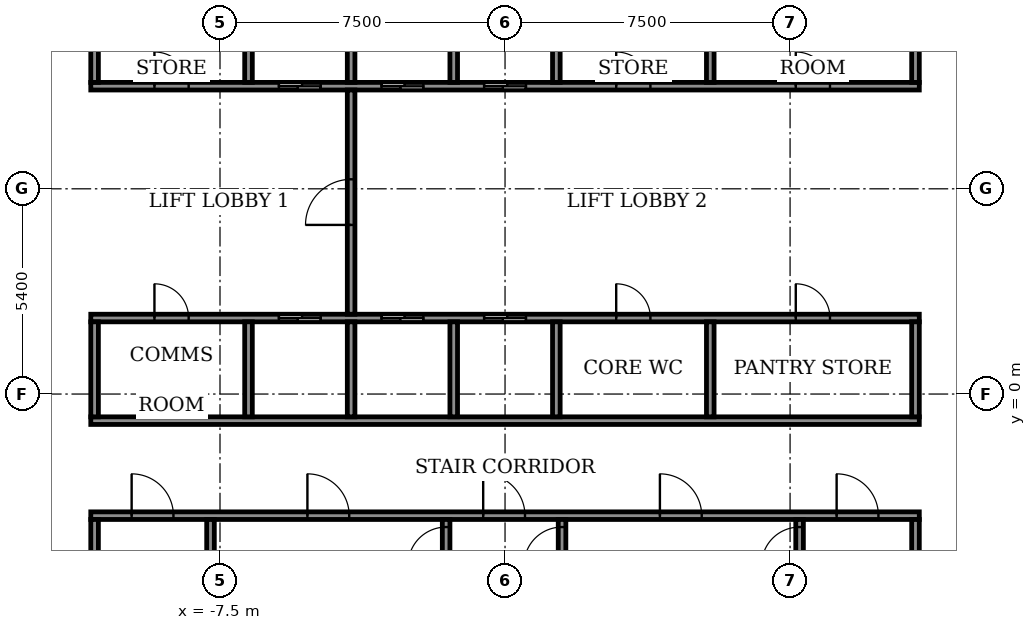
"""IFC4 building model, lengths in metres.
Left out: names, types, materials, properties, quantities, classifications, styles, units other than length and angle.
Written with IfcOpenShell. Run it as: python <this file> out.ifc"""

import sys

from ifc_helpers import new_model, si_unit, direction, frame, frame_2d, origin, place, context, subcontext, project, spatial, rectangle, extrude, element, fill, save


model = new_model("IFC4")
c1 = context("Model", 3, precision=1e-05, world=origin(), true_north=direction((0.0, 1.0)))
c2 = subcontext(c1, "Body", "Model", "MODEL_VIEW")
j1 = project(units=[si_unit("LENGTHUNIT", "METRE"), si_unit("PLANEANGLEUNIT", "RADIAN")], contexts=[c1])
p1 = place(None, origin())
s1 = spatial("IfcSite", under=j1, at=p1, CompositionType="ELEMENT")
p2 = place(p1, origin())
s2 = spatial("IfcBuilding", under=s1, at=p2, CompositionType="ELEMENT")
p3 = place(p2, frame((0.0, 0.0, 301.5)))
s3 = spatial("IfcBuildingStorey", under=s2, at=p3, CompositionType="ELEMENT", Elevation=301.5)
p4 = place(p3, frame((-10.9, -3.2, 0.0), z_axis=(0.0, 0.0, 1.0), x_axis=(1.0, 0.0, 0.0)))
e1 = element("IfcWall", 1, at=p4, inside=s3, PredefinedType="SHEAR", context=c2, shape_type="SweptSolid", body=[
    extrude(rectangle(XDim=21.8, YDim=0.2, at=frame_2d((10.9, 0.0))), origin(), (0.0, 0.0, 1.0), 4.05),
])
p5 = place(p4, frame((1.075, 0.0, 0.0)))
e2 = element("IfcOpeningElement", 2, at=p5, cuts=e1, PredefinedType="OPENING", context=c2, shape_type="SweptSolid", body=[
    extrude(rectangle(XDim=1.1, YDim=2.1, at=frame_2d((0.55, 1.05))), frame((0.0, 0.11, 0.0), z_axis=(0.0, -1.0, 0.0), x_axis=(1.0, 0.0, 0.0)), (0.0, 0.0, 1.0), 0.22),
])
p6 = place(p4, frame((10.325, 0.0, 0.0)))
e3 = element("IfcOpeningElement", 3, at=p6, cuts=e1, PredefinedType="OPENING", context=c2, shape_type="SweptSolid", body=[
    extrude(rectangle(XDim=1.1, YDim=2.1, at=frame_2d((0.55, 1.05))), frame((0.0, 0.11, 0.0), z_axis=(0.0, -1.0, 0.0), x_axis=(1.0, 0.0, 0.0)), (0.0, 0.0, 1.0), 0.22),
])
p7 = place(p4, frame((19.625, 0.0, 0.0)))
e4 = element("IfcOpeningElement", 4, at=p7, cuts=e1, PredefinedType="OPENING", context=c2, shape_type="SweptSolid", body=[
    extrude(rectangle(XDim=1.1, YDim=2.1, at=frame_2d((0.55, 1.05))), frame((0.0, 0.11, 0.0), z_axis=(0.0, -1.0, 0.0), x_axis=(1.0, 0.0, 0.0)), (0.0, 0.0, 1.0), 0.22),
])
p8 = place(p4, frame((5.7, 0.0, 0.0)))
e5 = element("IfcOpeningElement", 5, at=p8, cuts=e1, PredefinedType="OPENING", context=c2, shape_type="SweptSolid", body=[
    extrude(rectangle(XDim=1.1, YDim=2.1, at=frame_2d((0.55, 1.05))), frame((0.0, 0.11, 0.0), z_axis=(0.0, -1.0, 0.0), x_axis=(1.0, 0.0, 0.0)), (0.0, 0.0, 1.0), 0.22),
])
p9 = place(p4, frame((14.975, 0.0, 0.0)))
e6 = element("IfcOpeningElement", 6, at=p9, cuts=e1, PredefinedType="OPENING", context=c2, shape_type="SweptSolid", body=[
    extrude(rectangle(XDim=1.1, YDim=2.1, at=frame_2d((0.55, 1.05))), frame((0.0, 0.11, 0.0), z_axis=(0.0, -1.0, 0.0), x_axis=(1.0, 0.0, 0.0)), (0.0, 0.0, 1.0), 0.22),
])
p10 = place(p3, frame((-10.9, -0.7, 0.0), z_axis=(0.0, 0.0, 1.0), x_axis=(1.0, 0.0, 0.0)))
e7 = element("IfcWall", 7, at=p10, inside=s3, PredefinedType="SHEAR", context=c2, shape_type="SweptSolid", body=[
    extrude(rectangle(XDim=21.8, YDim=0.2, at=frame_2d((10.9, 0.0))), origin(), (0.0, 0.0, 1.0), 4.05),
])
p11 = place(p3, frame((-10.9, 2.0, 0.0), z_axis=(0.0, 0.0, 1.0), x_axis=(1.0, 0.0, 0.0)))
e8 = element("IfcWall", 8, at=p11, inside=s3, PredefinedType="SHEAR", context=c2, shape_type="SweptSolid", body=[
    extrude(rectangle(XDim=21.8, YDim=0.2, at=frame_2d((10.9, 0.0))), origin(), (0.0, 0.0, 1.0), 4.05),
])
p12 = place(p11, frame((4.95, 0.0, 0.0)))
e9 = element("IfcOpeningElement", 9, at=p12, cuts=e8, PredefinedType="OPENING", context=c2, shape_type="SweptSolid", body=[
    extrude(rectangle(XDim=1.1, YDim=2.1, at=frame_2d((0.55, 1.05))), frame((0.0, 0.11, 0.0), z_axis=(0.0, -1.0, 0.0), x_axis=(1.0, 0.0, 0.0)), (0.0, 0.0, 1.0), 0.22),
])
p13 = place(p11, frame((7.65, 0.0, 0.0)))
e10 = element("IfcOpeningElement", 10, at=p13, cuts=e8, PredefinedType="OPENING", context=c2, shape_type="SweptSolid", body=[
    extrude(rectangle(XDim=1.1, YDim=2.1, at=frame_2d((0.55, 1.05))), frame((0.0, 0.11, 0.0), z_axis=(0.0, -1.0, 0.0), x_axis=(1.0, 0.0, 0.0)), (0.0, 0.0, 1.0), 0.22),
])
p14 = place(p11, frame((10.35, 0.0, 0.0)))
e11 = element("IfcOpeningElement", 11, at=p14, cuts=e8, PredefinedType="OPENING", context=c2, shape_type="SweptSolid", body=[
    extrude(rectangle(XDim=1.1, YDim=2.1, at=frame_2d((0.55, 1.05))), frame((0.0, 0.11, 0.0), z_axis=(0.0, -1.0, 0.0), x_axis=(1.0, 0.0, 0.0)), (0.0, 0.0, 1.0), 0.22),
])
p15 = place(p11, frame((1.675, 0.0, 0.0)))
e12 = element("IfcOpeningElement", 12, at=p15, cuts=e8, PredefinedType="OPENING", context=c2, shape_type="SweptSolid", body=[
    extrude(rectangle(XDim=0.9, YDim=2.1, at=frame_2d((0.45, 1.05))), frame((0.0, 0.11, 0.0), z_axis=(0.0, -1.0, 0.0), x_axis=(1.0, 0.0, 0.0)), (0.0, 0.0, 1.0), 0.22),
])
p16 = place(p11, frame((13.825, 0.0, 0.0)))
e13 = element("IfcOpeningElement", 13, at=p16, cuts=e8, PredefinedType="OPENING", context=c2, shape_type="SweptSolid", body=[
    extrude(rectangle(XDim=0.9, YDim=2.1, at=frame_2d((0.45, 1.05))), frame((0.0, 0.11, 0.0), z_axis=(0.0, -1.0, 0.0), x_axis=(1.0, 0.0, 0.0)), (0.0, 0.0, 1.0), 0.22),
])
p17 = place(p11, frame((18.55, 0.0, 0.0)))
e14 = element("IfcOpeningElement", 14, at=p17, cuts=e8, PredefinedType="OPENING", context=c2, shape_type="SweptSolid", body=[
    extrude(rectangle(XDim=0.9, YDim=2.1, at=frame_2d((0.45, 1.05))), frame((0.0, 0.11, 0.0), z_axis=(0.0, -1.0, 0.0), x_axis=(1.0, 0.0, 0.0)), (0.0, 0.0, 1.0), 0.22),
])
p18 = place(p3, frame((-10.9, 8.1, 0.0), z_axis=(0.0, 0.0, 1.0), x_axis=(1.0, 0.0, 0.0)))
e15 = element("IfcWall", 15, at=p18, inside=s3, PredefinedType="SHEAR", context=c2, shape_type="SweptSolid", body=[
    extrude(rectangle(XDim=21.8, YDim=0.2, at=frame_2d((10.9, 0.0))), origin(), (0.0, 0.0, 1.0), 4.05),
])
p19 = place(p18, frame((4.95, 0.0, 0.0)))
e16 = element("IfcOpeningElement", 16, at=p19, cuts=e15, PredefinedType="OPENING", context=c2, shape_type="SweptSolid", body=[
    extrude(rectangle(XDim=1.1, YDim=2.1, at=frame_2d((0.55, 1.05))), frame((0.0, 0.11, 0.0), z_axis=(0.0, -1.0, 0.0), x_axis=(1.0, 0.0, 0.0)), (0.0, 0.0, 1.0), 0.22),
])
p20 = place(p18, frame((7.65, 0.0, 0.0)))
e17 = element("IfcOpeningElement", 17, at=p20, cuts=e15, PredefinedType="OPENING", context=c2, shape_type="SweptSolid", body=[
    extrude(rectangle(XDim=1.1, YDim=2.1, at=frame_2d((0.55, 1.05))), frame((0.0, 0.11, 0.0), z_axis=(0.0, -1.0, 0.0), x_axis=(1.0, 0.0, 0.0)), (0.0, 0.0, 1.0), 0.22),
])
p21 = place(p18, frame((10.35, 0.0, 0.0)))
e18 = element("IfcOpeningElement", 18, at=p21, cuts=e15, PredefinedType="OPENING", context=c2, shape_type="SweptSolid", body=[
    extrude(rectangle(XDim=1.1, YDim=2.1, at=frame_2d((0.55, 1.05))), frame((0.0, 0.11, 0.0), z_axis=(0.0, -1.0, 0.0), x_axis=(1.0, 0.0, 0.0)), (0.0, 0.0, 1.0), 0.22),
])
p22 = place(p18, frame((1.675, 0.0, 0.0)))
e19 = element("IfcOpeningElement", 19, at=p22, cuts=e15, PredefinedType="OPENING", context=c2, shape_type="SweptSolid", body=[
    extrude(rectangle(XDim=0.9, YDim=2.1, at=frame_2d((0.45, 1.05))), frame((0.0, 0.11, 0.0), z_axis=(0.0, -1.0, 0.0), x_axis=(1.0, 0.0, 0.0)), (0.0, 0.0, 1.0), 0.22),
])
p23 = place(p18, frame((13.825, 0.0, 0.0)))
e20 = element("IfcOpeningElement", 20, at=p23, cuts=e15, PredefinedType="OPENING", context=c2, shape_type="SweptSolid", body=[
    extrude(rectangle(XDim=0.9, YDim=2.1, at=frame_2d((0.45, 1.05))), frame((0.0, 0.11, 0.0), z_axis=(0.0, -1.0, 0.0), x_axis=(1.0, 0.0, 0.0)), (0.0, 0.0, 1.0), 0.22),
])
p24 = place(p18, frame((18.55, 0.0, 0.0)))
e21 = element("IfcOpeningElement", 21, at=p24, cuts=e15, PredefinedType="OPENING", context=c2, shape_type="SweptSolid", body=[
    extrude(rectangle(XDim=0.9, YDim=2.1, at=frame_2d((0.45, 1.05))), frame((0.0, 0.11, 0.0), z_axis=(0.0, -1.0, 0.0), x_axis=(1.0, 0.0, 0.0)), (0.0, 0.0, 1.0), 0.22),
])
for number, where, z_axis, x_axis in (
    (22, (-10.8, -10.8, 0.0), (0.0, 0.0, 1.0), (0.0, 1.0, 0.0)),
    (23, (-7.75, -10.8, 0.0), (0.0, 0.0, 1.0), (0.0, 1.0, 0.0)),
):
    element("IfcWall", number, at=place(p3, frame(where, z_axis=z_axis, x_axis=x_axis)), inside=s3, PredefinedType="SHEAR", context=c2, shape_type="SweptSolid", body=[
        extrude(rectangle(XDim=7.5, YDim=0.2, at=frame_2d((3.75, 0.0))), origin(), (0.0, 0.0, 1.0), 4.05),
    ])
p25 = place(p3, frame((-1.55, -10.8, 0.0), z_axis=(0.0, 0.0, 1.0), x_axis=(0.0, 1.0, 0.0)))
e24 = element("IfcWall", 24, at=p25, inside=s3, PredefinedType="SHEAR", context=c2, shape_type="SweptSolid", body=[
    extrude(rectangle(XDim=7.5, YDim=0.2, at=frame_2d((3.75, 0.0))), origin(), (0.0, 0.0, 1.0), 4.05),
])
p26 = place(p25, frame((6.3, 0.0, 0.0)))
e25 = element("IfcOpeningElement", 25, at=p26, cuts=e24, PredefinedType="OPENING", context=c2, shape_type="SweptSolid", body=[
    extrude(rectangle(XDim=1.0, YDim=2.1, at=frame_2d((0.5, 1.05))), frame((0.0, 0.11, 0.0), z_axis=(0.0, -1.0, 0.0), x_axis=(1.0, 0.0, 0.0)), (0.0, 0.0, 1.0), 0.22),
])
p27 = place(p3, frame((1.5, -10.8, 0.0), z_axis=(0.0, 0.0, 1.0), x_axis=(0.0, 1.0, 0.0)))
e26 = element("IfcWall", 26, at=p27, inside=s3, PredefinedType="SHEAR", context=c2, shape_type="SweptSolid", body=[
    extrude(rectangle(XDim=7.5, YDim=0.2, at=frame_2d((3.75, 0.0))), origin(), (0.0, 0.0, 1.0), 4.05),
])
p28 = place(p27, frame((6.3, 0.0, 0.0)))
e27 = element("IfcOpeningElement", 27, at=p28, cuts=e26, PredefinedType="OPENING", context=c2, shape_type="SweptSolid", body=[
    extrude(rectangle(XDim=1.0, YDim=2.1, at=frame_2d((0.5, 1.05))), frame((0.0, 0.11, 0.0), z_axis=(0.0, -1.0, 0.0), x_axis=(1.0, 0.0, 0.0)), (0.0, 0.0, 1.0), 0.22),
])
p29 = place(p3, frame((7.75, -10.8, 0.0), z_axis=(0.0, 0.0, 1.0), x_axis=(0.0, 1.0, 0.0)))
e28 = element("IfcWall", 28, at=p29, inside=s3, PredefinedType="SHEAR", context=c2, shape_type="SweptSolid", body=[
    extrude(rectangle(XDim=7.5, YDim=0.2, at=frame_2d((3.75, 0.0))), origin(), (0.0, 0.0, 1.0), 4.05),
])
p30 = place(p29, frame((6.3, 0.0, 0.0)))
e29 = element("IfcOpeningElement", 29, at=p30, cuts=e28, PredefinedType="OPENING", context=c2, shape_type="SweptSolid", body=[
    extrude(rectangle(XDim=1.0, YDim=2.1, at=frame_2d((0.5, 1.05))), frame((0.0, 0.11, 0.0), z_axis=(0.0, -1.0, 0.0), x_axis=(1.0, 0.0, 0.0)), (0.0, 0.0, 1.0), 0.22),
])
p31 = place(p3, frame((10.8, -10.8, 0.0), z_axis=(0.0, 0.0, 1.0), x_axis=(0.0, 1.0, 0.0)))
e30 = element("IfcWall", 30, at=p31, inside=s3, PredefinedType="SHEAR", context=c2, shape_type="SweptSolid", body=[
    extrude(rectangle(XDim=7.5, YDim=0.2, at=frame_2d((3.75, 0.0))), origin(), (0.0, 0.0, 1.0), 4.05),
])
p32 = place(p3, frame((-10.8, -0.6, 0.0), z_axis=(0.0, 0.0, 1.0), x_axis=(0.0, 1.0, 0.0)))
e31 = element("IfcWall", 31, at=p32, inside=s3, PredefinedType="STANDARD", context=c2, shape_type="SweptSolid", body=[
    extrude(rectangle(XDim=2.5, YDim=0.2, at=frame_2d((1.25, 0.0))), origin(), (0.0, 0.0, 1.0), 4.05),
])
for number, where, z_axis, x_axis in (
    (32, (-6.75, -0.6, 0.0), (0.0, 0.0, 1.0), (0.0, 1.0, 0.0)),
    (33, (-4.05, -0.6, 0.0), (0.0, 0.0, 1.0), (0.0, 1.0, 0.0)),
    (34, (-1.35, -0.6, 0.0), (0.0, 0.0, 1.0), (0.0, 1.0, 0.0)),
    (35, (1.35, -0.6, 0.0), (0.0, 0.0, 1.0), (0.0, 1.0, 0.0)),
):
    element("IfcWall", number, at=place(p3, frame(where, z_axis=z_axis, x_axis=x_axis)), inside=s3, PredefinedType="SHEAR", context=c2, shape_type="SweptSolid", body=[
        extrude(rectangle(XDim=2.5, YDim=0.2, at=frame_2d((1.25, 0.0))), origin(), (0.0, 0.0, 1.0), 4.05),
    ])
for number, where, z_axis, x_axis in (
    (36, (5.4, -0.6, 0.0), (0.0, 0.0, 1.0), (0.0, 1.0, 0.0)),
    (37, (10.8, -0.6, 0.0), (0.0, 0.0, 1.0), (0.0, 1.0, 0.0)),
):
    element("IfcWall", number, at=place(p3, frame(where, z_axis=z_axis, x_axis=x_axis)), inside=s3, PredefinedType="STANDARD", context=c2, shape_type="SweptSolid", body=[
        extrude(rectangle(XDim=2.5, YDim=0.2, at=frame_2d((1.25, 0.0))), origin(), (0.0, 0.0, 1.0), 4.05),
    ])
p33 = place(p3, frame((-10.8, 8.2, 0.0), z_axis=(0.0, 0.0, 1.0), x_axis=(0.0, 1.0, 0.0)))
e38 = element("IfcWall", 38, at=p33, inside=s3, PredefinedType="STANDARD", context=c2, shape_type="SweptSolid", body=[
    extrude(rectangle(XDim=2.6, YDim=0.2, at=frame_2d((1.3, 0.0))), origin(), (0.0, 0.0, 1.0), 4.05),
])
for number, where, z_axis, x_axis in (
    (39, (-6.75, 8.2, 0.0), (0.0, 0.0, 1.0), (0.0, 1.0, 0.0)),
    (40, (-4.05, 8.2, 0.0), (0.0, 0.0, 1.0), (0.0, 1.0, 0.0)),
    (41, (-1.35, 8.2, 0.0), (0.0, 0.0, 1.0), (0.0, 1.0, 0.0)),
    (42, (1.35, 8.2, 0.0), (0.0, 0.0, 1.0), (0.0, 1.0, 0.0)),
):
    element("IfcWall", number, at=place(p3, frame(where, z_axis=z_axis, x_axis=x_axis)), inside=s3, PredefinedType="SHEAR", context=c2, shape_type="SweptSolid", body=[
        extrude(rectangle(XDim=2.6, YDim=0.2, at=frame_2d((1.3, 0.0))), origin(), (0.0, 0.0, 1.0), 4.05),
    ])
for number, where, z_axis, x_axis in (
    (43, (5.4, 8.2, 0.0), (0.0, 0.0, 1.0), (0.0, 1.0, 0.0)),
    (44, (10.8, 8.2, 0.0), (0.0, 0.0, 1.0), (0.0, 1.0, 0.0)),
):
    element("IfcWall", number, at=place(p3, frame(where, z_axis=z_axis, x_axis=x_axis)), inside=s3, PredefinedType="STANDARD", context=c2, shape_type="SweptSolid", body=[
        extrude(rectangle(XDim=2.6, YDim=0.2, at=frame_2d((1.3, 0.0))), origin(), (0.0, 0.0, 1.0), 4.05),
    ])
p34 = place(p3, frame((-4.05, 2.1, 0.0), z_axis=(0.0, 0.0, 1.0), x_axis=(0.0, 1.0, 0.0)))
e45 = element("IfcWall", 45, at=p34, inside=s3, PredefinedType="STANDARD", context=c2, shape_type="SweptSolid", body=[
    extrude(rectangle(XDim=5.9, YDim=0.2, at=frame_2d((2.95, 0.0))), origin(), (0.0, 0.0, 1.0), 4.05),
])
p35 = place(p34, frame((2.35, 0.0, 0.0)))
e46 = element("IfcOpeningElement", 46, at=p35, cuts=e45, PredefinedType="OPENING", context=c2, shape_type="SweptSolid", body=[
    extrude(rectangle(XDim=1.2, YDim=2.1, at=frame_2d((0.6, 1.05))), frame((0.0, 0.11, 0.0), z_axis=(0.0, -1.0, 0.0), x_axis=(1.0, 0.0, 0.0)), (0.0, 0.0, 1.0), 0.22),
])
p36 = place(p12, origin())
e47 = element("IfcDoor", 47, at=p36, inside=s3, OperationType="SLIDING_TO_LEFT", PredefinedType="DOOR", context=c2, shape_type="SweptSolid", body=[
    extrude(rectangle(XDim=1.1, YDim=2.1, at=frame_2d((0.55, 1.05))), frame((0.0, 0.025, 0.0), z_axis=(0.0, -1.0, 0.0), x_axis=(1.0, 0.0, 0.0)), (0.0, 0.0, 1.0), 0.05),
])
fill(e9, e47)
p37 = place(p13, origin())
e48 = element("IfcDoor", 48, at=p37, inside=s3, OperationType="SLIDING_TO_LEFT", PredefinedType="DOOR", context=c2, shape_type="SweptSolid", body=[
    extrude(rectangle(XDim=1.1, YDim=2.1, at=frame_2d((0.55, 1.05))), frame((0.0, 0.025, 0.0), z_axis=(0.0, -1.0, 0.0), x_axis=(1.0, 0.0, 0.0)), (0.0, 0.0, 1.0), 0.05),
])
fill(e10, e48)
p38 = place(p14, origin())
e49 = element("IfcDoor", 49, at=p38, inside=s3, OperationType="SLIDING_TO_LEFT", PredefinedType="DOOR", context=c2, shape_type="SweptSolid", body=[
    extrude(rectangle(XDim=1.1, YDim=2.1, at=frame_2d((0.55, 1.05))), frame((0.0, 0.025, 0.0), z_axis=(0.0, -1.0, 0.0), x_axis=(1.0, 0.0, 0.0)), (0.0, 0.0, 1.0), 0.05),
])
fill(e11, e49)
p39 = place(p19, origin())
e50 = element("IfcDoor", 50, at=p39, inside=s3, OperationType="SLIDING_TO_LEFT", PredefinedType="DOOR", context=c2, shape_type="SweptSolid", body=[
    extrude(rectangle(XDim=1.1, YDim=2.1, at=frame_2d((0.55, 1.05))), frame((0.0, 0.025, 0.0), z_axis=(0.0, -1.0, 0.0), x_axis=(1.0, 0.0, 0.0)), (0.0, 0.0, 1.0), 0.05),
])
fill(e16, e50)
p40 = place(p20, origin())
e51 = element("IfcDoor", 51, at=p40, inside=s3, OperationType="SLIDING_TO_LEFT", PredefinedType="DOOR", context=c2, shape_type="SweptSolid", body=[
    extrude(rectangle(XDim=1.1, YDim=2.1, at=frame_2d((0.55, 1.05))), frame((0.0, 0.025, 0.0), z_axis=(0.0, -1.0, 0.0), x_axis=(1.0, 0.0, 0.0)), (0.0, 0.0, 1.0), 0.05),
])
fill(e17, e51)
p41 = place(p21, origin())
e52 = element("IfcDoor", 52, at=p41, inside=s3, OperationType="SLIDING_TO_LEFT", PredefinedType="DOOR", context=c2, shape_type="SweptSolid", body=[
    extrude(rectangle(XDim=1.1, YDim=2.1, at=frame_2d((0.55, 1.05))), frame((0.0, 0.025, 0.0), z_axis=(0.0, -1.0, 0.0), x_axis=(1.0, 0.0, 0.0)), (0.0, 0.0, 1.0), 0.05),
])
fill(e18, e52)
p42 = place(p15, origin())
e53 = element("IfcDoor", 53, at=p42, inside=s3, OperationType="SINGLE_SWING_LEFT", PredefinedType="DOOR", context=c2, shape_type="SweptSolid", body=[
    extrude(rectangle(XDim=0.9, YDim=2.1, at=frame_2d((0.45, 1.05))), frame((0.0, 0.025, 0.0), z_axis=(0.0, -1.0, 0.0), x_axis=(1.0, 0.0, 0.0)), (0.0, 0.0, 1.0), 0.05),
])
fill(e12, e53)
p43 = place(p16, origin())
e54 = element("IfcDoor", 54, at=p43, inside=s3, OperationType="SINGLE_SWING_RIGHT", PredefinedType="DOOR", context=c2, shape_type="SweptSolid", body=[
    extrude(rectangle(XDim=0.9, YDim=2.1, at=frame_2d((0.45, 1.05))), frame((0.0, 0.025, 0.0), z_axis=(0.0, -1.0, 0.0), x_axis=(1.0, 0.0, 0.0)), (0.0, 0.0, 1.0), 0.05),
])
fill(e13, e54)
p44 = place(p17, origin())
e55 = element("IfcDoor", 55, at=p44, inside=s3, OperationType="SINGLE_SWING_RIGHT", PredefinedType="DOOR", context=c2, shape_type="SweptSolid", body=[
    extrude(rectangle(XDim=0.9, YDim=2.1, at=frame_2d((0.45, 1.05))), frame((0.0, 0.025, 0.0), z_axis=(0.0, -1.0, 0.0), x_axis=(1.0, 0.0, 0.0)), (0.0, 0.0, 1.0), 0.05),
])
fill(e14, e55)
p45 = place(p22, origin())
e56 = element("IfcDoor", 56, at=p45, inside=s3, OperationType="SINGLE_SWING_RIGHT", PredefinedType="DOOR", context=c2, shape_type="SweptSolid", body=[
    extrude(rectangle(XDim=0.9, YDim=2.1, at=frame_2d((0.45, 1.05))), frame((0.0, 0.025, 0.0), z_axis=(0.0, -1.0, 0.0), x_axis=(1.0, 0.0, 0.0)), (0.0, 0.0, 1.0), 0.05),
])
fill(e19, e56)
p46 = place(p23, origin())
e57 = element("IfcDoor", 57, at=p46, inside=s3, OperationType="SINGLE_SWING_RIGHT", PredefinedType="DOOR", context=c2, shape_type="SweptSolid", body=[
    extrude(rectangle(XDim=0.9, YDim=2.1, at=frame_2d((0.45, 1.05))), frame((0.0, 0.025, 0.0), z_axis=(0.0, -1.0, 0.0), x_axis=(1.0, 0.0, 0.0)), (0.0, 0.0, 1.0), 0.05),
])
fill(e20, e57)
p47 = place(p24, origin())
e58 = element("IfcDoor", 58, at=p47, inside=s3, OperationType="SINGLE_SWING_LEFT", PredefinedType="DOOR", context=c2, shape_type="SweptSolid", body=[
    extrude(rectangle(XDim=0.9, YDim=2.1, at=frame_2d((0.45, 1.05))), frame((0.0, 0.025, 0.0), z_axis=(0.0, -1.0, 0.0), x_axis=(1.0, 0.0, 0.0)), (0.0, 0.0, 1.0), 0.05),
])
fill(e21, e58)
p48 = place(p5, origin())
e59 = element("IfcDoor", 59, at=p48, inside=s3, OperationType="SINGLE_SWING_RIGHT", PredefinedType="DOOR", context=c2, shape_type="SweptSolid", body=[
    extrude(rectangle(XDim=1.1, YDim=2.1, at=frame_2d((0.55, 1.05))), frame((0.0, 0.025, 0.0), z_axis=(0.0, -1.0, 0.0), x_axis=(1.0, 0.0, 0.0)), (0.0, 0.0, 1.0), 0.05),
])
fill(e2, e59)
p49 = place(p6, origin())
e60 = element("IfcDoor", 60, at=p49, inside=s3, OperationType="SINGLE_SWING_RIGHT", PredefinedType="DOOR", context=c2, shape_type="SweptSolid", body=[
    extrude(rectangle(XDim=1.1, YDim=2.1, at=frame_2d((0.55, 1.05))), frame((0.0, 0.025, 0.0), z_axis=(0.0, -1.0, 0.0), x_axis=(1.0, 0.0, 0.0)), (0.0, 0.0, 1.0), 0.05),
])
fill(e3, e60)
p50 = place(p7, origin())
e61 = element("IfcDoor", 61, at=p50, inside=s3, OperationType="SINGLE_SWING_RIGHT", PredefinedType="DOOR", context=c2, shape_type="SweptSolid", body=[
    extrude(rectangle(XDim=1.1, YDim=2.1, at=frame_2d((0.55, 1.05))), frame((0.0, 0.025, 0.0), z_axis=(0.0, -1.0, 0.0), x_axis=(1.0, 0.0, 0.0)), (0.0, 0.0, 1.0), 0.05),
])
fill(e4, e61)
p51 = place(p8, origin())
e62 = element("IfcDoor", 62, at=p51, inside=s3, OperationType="SINGLE_SWING_LEFT", PredefinedType="DOOR", context=c2, shape_type="SweptSolid", body=[
    extrude(rectangle(XDim=1.1, YDim=2.1, at=frame_2d((0.55, 1.05))), frame((0.0, 0.025, 0.0), z_axis=(0.0, -1.0, 0.0), x_axis=(1.0, 0.0, 0.0)), (0.0, 0.0, 1.0), 0.05),
])
fill(e5, e62)
p52 = place(p9, origin())
e63 = element("IfcDoor", 63, at=p52, inside=s3, OperationType="SINGLE_SWING_LEFT", PredefinedType="DOOR", context=c2, shape_type="SweptSolid", body=[
    extrude(rectangle(XDim=1.1, YDim=2.1, at=frame_2d((0.55, 1.05))), frame((0.0, 0.025, 0.0), z_axis=(0.0, -1.0, 0.0), x_axis=(1.0, 0.0, 0.0)), (0.0, 0.0, 1.0), 0.05),
])
fill(e6, e63)
p53 = place(p26, origin())
e64 = element("IfcDoor", 64, at=p53, inside=s3, OperationType="SINGLE_SWING_RIGHT", PredefinedType="DOOR", context=c2, shape_type="SweptSolid", body=[
    extrude(rectangle(XDim=1.0, YDim=2.1, at=frame_2d((0.5, 1.05))), frame((0.0, 0.025, 0.0), z_axis=(0.0, -1.0, 0.0), x_axis=(1.0, 0.0, 0.0)), (0.0, 0.0, 1.0), 0.05),
])
fill(e25, e64)
p54 = place(p28, origin())
e65 = element("IfcDoor", 65, at=p54, inside=s3, OperationType="SINGLE_SWING_RIGHT", PredefinedType="DOOR", context=c2, shape_type="SweptSolid", body=[
    extrude(rectangle(XDim=1.0, YDim=2.1, at=frame_2d((0.5, 1.05))), frame((0.0, 0.025, 0.0), z_axis=(0.0, -1.0, 0.0), x_axis=(1.0, 0.0, 0.0)), (0.0, 0.0, 1.0), 0.05),
])
fill(e27, e65)
p55 = place(p30, origin())
e66 = element("IfcDoor", 66, at=p55, inside=s3, OperationType="SINGLE_SWING_RIGHT", PredefinedType="DOOR", context=c2, shape_type="SweptSolid", body=[
    extrude(rectangle(XDim=1.0, YDim=2.1, at=frame_2d((0.5, 1.05))), frame((0.0, 0.025, 0.0), z_axis=(0.0, -1.0, 0.0), x_axis=(1.0, 0.0, 0.0)), (0.0, 0.0, 1.0), 0.05),
])
fill(e29, e66)
p56 = place(p35, origin())
e67 = element("IfcDoor", 67, at=p56, inside=s3, OperationType="SINGLE_SWING_LEFT", PredefinedType="DOOR", context=c2, shape_type="SweptSolid", body=[
    extrude(rectangle(XDim=1.2, YDim=2.1, at=frame_2d((0.6, 1.05))), frame((0.0, 0.025, 0.0), z_axis=(0.0, -1.0, 0.0), x_axis=(1.0, 0.0, 0.0)), (0.0, 0.0, 1.0), 0.05),
])
fill(e46, e67)
save(model, sys.argv[1])
